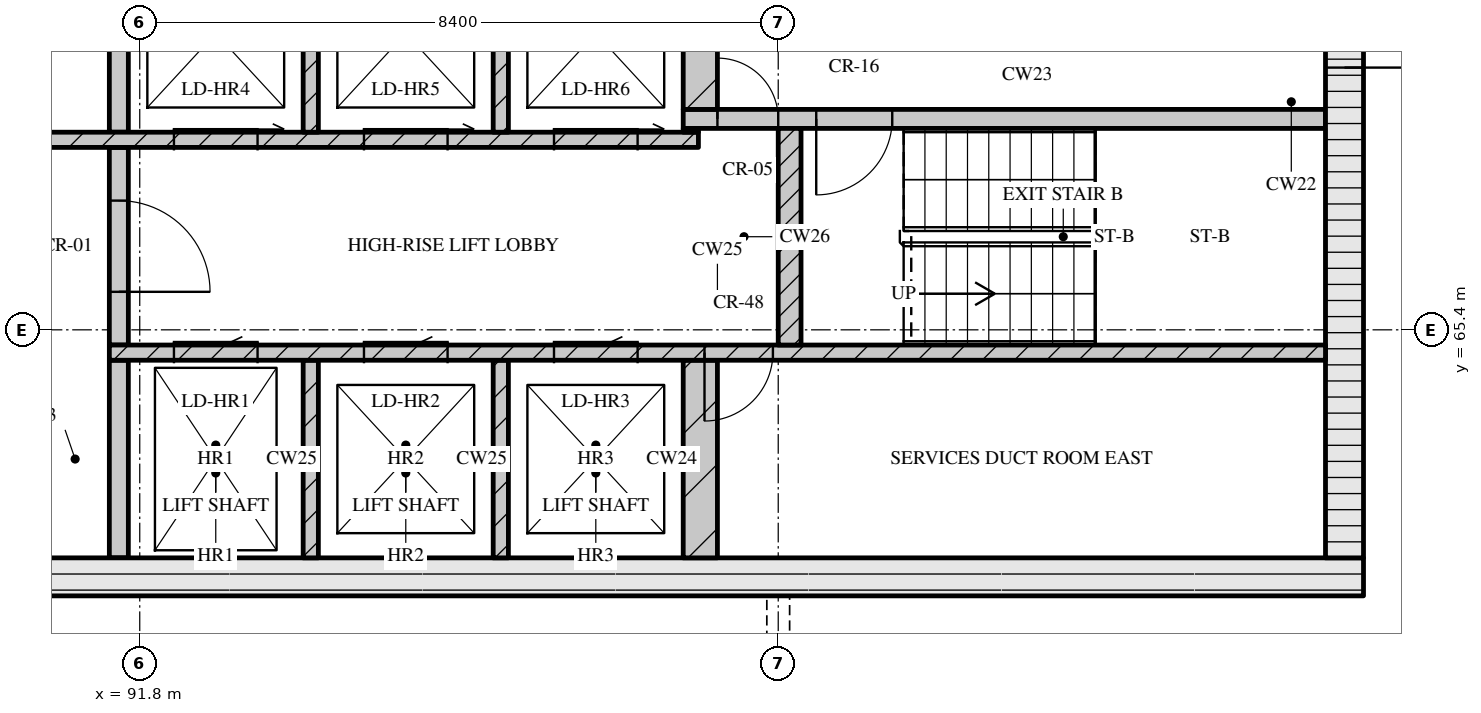
"""IFC4 building model, lengths in metres.
Left out: names, types, materials, properties, quantities, classifications, styles, units other than length and angle.
Written with IfcOpenShell. Run it as: python <this file> out.ifc"""

import sys

from ifc_helpers import new_model, si_unit, direction, frame, frame_2d, origin, place, context, subcontext, project, spatial, rectangle, extrude, element, fill, save


model = new_model("IFC4")
c1 = context("Model", 3, precision=1e-05, world=origin(), true_north=direction((0.0, 1.0)))
c2 = subcontext(c1, "Body", "Model", "MODEL_VIEW")
j1 = project(units=[si_unit("LENGTHUNIT", "METRE"), si_unit("PLANEANGLEUNIT", "RADIAN")], contexts=[c1])
p1 = place(None, origin())
s1 = spatial("IfcSite", under=j1, at=p1, CompositionType="ELEMENT")
p2 = place(p1, origin())
s2 = spatial("IfcBuilding", under=s1, at=p2, CompositionType="ELEMENT")
p3 = place(p2, frame((0.0, 0.0, 263.55)))
s3 = spatial("IfcBuildingStorey", under=s2, at=p3, CompositionType="ELEMENT", Elevation=263.55)
p4 = place(p3, frame((67.3, 62.15, 0.0), z_axis=(0.0, 0.0, 1.0), x_axis=(1.0, 0.0, 0.0)))
e1 = element("IfcWall", 1, at=p4, inside=s3, PredefinedType="SOLIDWALL", context=c2, shape_type="SweptSolid", body=[
    extrude(rectangle(XDim=40.6, YDim=0.5, at=frame_2d((20.3, 0.0))), origin(), (0.0, 0.0, 1.0), 3.32),
])
p5 = place(p4, frame((20.65, 0.0, 0.0)))
e2 = element("IfcOpeningElement", 2, at=p5, cuts=e1, PredefinedType="OPENING", context=c2, shape_type="SweptSolid", body=[
    extrude(rectangle(XDim=1.8, YDim=2.1, at=frame_2d((0.9, 1.05))), frame((0.0, 0.26, 0.0), z_axis=(0.0, -1.0, 0.0), x_axis=(1.0, 0.0, 0.0)), (0.0, 0.0, 1.0), 0.52),
])
p6 = place(p3, frame((107.65, 62.4, 0.0), z_axis=(0.0, 0.0, 1.0), x_axis=(0.0, 1.0, 0.0)))
e3 = element("IfcWall", 3, at=p6, inside=s3, PredefinedType="SOLIDWALL", context=c2, shape_type="SweptSolid", body=[
    extrude(rectangle(XDim=12.0, YDim=0.5, at=frame_2d((6.0, 0.0))), origin(), (0.0, 0.0, 1.0), 3.32),
])
p7 = place(p6, frame((6.45, 0.0, 0.0)))
e4 = element("IfcOpeningElement", 4, at=p7, cuts=e3, PredefinedType="OPENING", context=c2, shape_type="SweptSolid", body=[
    extrude(rectangle(XDim=1.2, YDim=2.1, at=frame_2d((0.6, 1.05))), frame((0.0, 0.26, 0.0), z_axis=(0.0, -1.0, 0.0), x_axis=(1.0, 0.0, 0.0)), (0.0, 0.0, 1.0), 0.52),
])
p8 = place(p3, frame((91.525, 62.4, 0.0), z_axis=(0.0, 0.0, 1.0), x_axis=(0.0, 1.0, 0.0)))
e5 = element("IfcWall", 5, at=p8, inside=s3, PredefinedType="SOLIDWALL", context=c2, shape_type="SweptSolid", body=[
    extrude(rectangle(XDim=2.6, YDim=0.25, at=frame_2d((1.3, 0.0))), origin(), (0.0, 0.0, 1.0), 3.32),
])
for number, where, z_axis, x_axis in (
    (6, (94.05, 62.4, 0.0), (0.0, 0.0, 1.0), (0.0, 1.0, 0.0)),
    (7, (96.55, 62.4, 0.0), (0.0, 0.0, 1.0), (0.0, 1.0, 0.0)),
):
    element("IfcWall", number, at=place(p3, frame(where, z_axis=z_axis, x_axis=x_axis)), inside=s3, PredefinedType="SOLIDWALL", context=c2, shape_type="SweptSolid", body=[
        extrude(rectangle(XDim=2.6, YDim=0.2, at=frame_2d((1.3, 0.0))), origin(), (0.0, 0.0, 1.0), 3.32),
    ])
p9 = place(p3, frame((99.175, 62.4, 0.0), z_axis=(0.0, 0.0, 1.0), x_axis=(0.0, 1.0, 0.0)))
e8 = element("IfcWall", 8, at=p9, inside=s3, PredefinedType="SOLIDWALL", context=c2, shape_type="SweptSolid", body=[
    extrude(rectangle(XDim=2.6, YDim=0.45, at=frame_2d((1.3, 0.0))), origin(), (0.0, 0.0, 1.0), 3.32),
])
p10 = place(p3, frame((91.4, 65.1, 0.0), z_axis=(0.0, 0.0, 1.0), x_axis=(1.0, 0.0, 0.0)))
e9 = element("IfcWall", 9, at=p10, inside=s3, PredefinedType="SOLIDWALL", context=c2, shape_type="SweptSolid", body=[
    extrude(rectangle(XDim=16.0, YDim=0.2, at=frame_2d((8.0, 0.0))), origin(), (0.0, 0.0, 1.0), 3.32),
])
p11 = place(p10, frame((0.85, 0.0, 0.0)))
e10 = element("IfcOpeningElement", 10, at=p11, cuts=e9, PredefinedType="OPENING", context=c2, shape_type="SweptSolid", body=[
    extrude(rectangle(XDim=1.1, YDim=2.1, at=frame_2d((0.55, 1.05))), frame((0.0, 0.11, 0.0), z_axis=(0.0, -1.0, 0.0), x_axis=(1.0, 0.0, 0.0)), (0.0, 0.0, 1.0), 0.22),
])
p12 = place(p10, frame((3.35, 0.0, 0.0)))
e11 = element("IfcOpeningElement", 11, at=p12, cuts=e9, PredefinedType="OPENING", context=c2, shape_type="SweptSolid", body=[
    extrude(rectangle(XDim=1.1, YDim=2.1, at=frame_2d((0.55, 1.05))), frame((0.0, 0.11, 0.0), z_axis=(0.0, -1.0, 0.0), x_axis=(1.0, 0.0, 0.0)), (0.0, 0.0, 1.0), 0.22),
])
p13 = place(p10, frame((5.85, 0.0, 0.0)))
e12 = element("IfcOpeningElement", 12, at=p13, cuts=e9, PredefinedType="OPENING", context=c2, shape_type="SweptSolid", body=[
    extrude(rectangle(XDim=1.1, YDim=2.1, at=frame_2d((0.55, 1.05))), frame((0.0, 0.11, 0.0), z_axis=(0.0, -1.0, 0.0), x_axis=(1.0, 0.0, 0.0)), (0.0, 0.0, 1.0), 0.22),
])
p14 = place(p10, frame((7.83, 0.0, 0.0)))
e13 = element("IfcOpeningElement", 13, at=p14, cuts=e9, PredefinedType="OPENING", context=c2, shape_type="SweptSolid", body=[
    extrude(rectangle(XDim=0.9, YDim=2.1, at=frame_2d((0.45, 1.05))), frame((0.0, 0.11, 0.0), z_axis=(0.0, -1.0, 0.0), x_axis=(1.0, 0.0, 0.0)), (0.0, 0.0, 1.0), 0.22),
])
p15 = place(p3, frame((91.525, 65.2, 0.0), z_axis=(0.0, 0.0, 1.0), x_axis=(0.0, 1.0, 0.0)))
e14 = element("IfcWall", 14, at=p15, inside=s3, PredefinedType="SOLIDWALL", context=c2, shape_type="SweptSolid", body=[
    extrude(rectangle(XDim=2.6, YDim=0.25, at=frame_2d((1.3, 0.0))), origin(), (0.0, 0.0, 1.0), 3.32),
])
p16 = place(p15, frame((0.7, 0.0, 0.0)))
e15 = element("IfcOpeningElement", 15, at=p16, cuts=e14, PredefinedType="OPENING", context=c2, shape_type="SweptSolid", body=[
    extrude(rectangle(XDim=1.2, YDim=2.1, at=frame_2d((0.6, 1.05))), frame((0.0, 0.135, 0.0), z_axis=(0.0, -1.0, 0.0), x_axis=(1.0, 0.0, 0.0)), (0.0, 0.0, 1.0), 0.27),
])
p17 = place(p3, frame((100.35, 65.2, 0.0), z_axis=(0.0, 0.0, 1.0), x_axis=(0.0, 1.0, 0.0)))
e16 = element("IfcWall", 16, at=p17, inside=s3, PredefinedType="SOLIDWALL", context=c2, shape_type="SweptSolid", body=[
    extrude(rectangle(XDim=2.85, YDim=0.3, at=frame_2d((1.425, 0.0))), origin(), (0.0, 0.0, 1.0), 3.32),
])
p18 = place(p3, frame((76.05, 67.9, 0.0), z_axis=(0.0, 0.0, 1.0), x_axis=(1.0, 0.0, 0.0)))
e17 = element("IfcWall", 17, at=p18, inside=s3, PredefinedType="SOLIDWALL", context=c2, shape_type="SweptSolid", body=[
    extrude(rectangle(XDim=23.1, YDim=0.2, at=frame_2d((11.55, 0.0))), origin(), (0.0, 0.0, 1.0), 3.32),
])
p19 = place(p18, frame((1.4, 0.0, 0.0)))
e18 = element("IfcOpeningElement", 18, at=p19, cuts=e17, PredefinedType="OPENING", context=c2, shape_type="SweptSolid", body=[
    extrude(rectangle(XDim=0.9, YDim=2.1, at=frame_2d((0.45, 1.05))), frame((0.0, 0.11, 0.0), z_axis=(0.0, -1.0, 0.0), x_axis=(1.0, 0.0, 0.0)), (0.0, 0.0, 1.0), 0.22),
])
p20 = place(p18, frame((5.11, 0.0, 0.0)))
e19 = element("IfcOpeningElement", 19, at=p20, cuts=e17, PredefinedType="OPENING", context=c2, shape_type="SweptSolid", body=[
    extrude(rectangle(XDim=0.9, YDim=2.1, at=frame_2d((0.45, 1.05))), frame((0.0, 0.11, 0.0), z_axis=(0.0, -1.0, 0.0), x_axis=(1.0, 0.0, 0.0)), (0.0, 0.0, 1.0), 0.22),
])
p21 = place(p18, frame((8.45, 0.0, 0.0)))
e20 = element("IfcOpeningElement", 20, at=p21, cuts=e17, PredefinedType="OPENING", context=c2, shape_type="SweptSolid", body=[
    extrude(rectangle(XDim=0.9, YDim=2.1, at=frame_2d((0.45, 1.05))), frame((0.0, 0.11, 0.0), z_axis=(0.0, -1.0, 0.0), x_axis=(1.0, 0.0, 0.0)), (0.0, 0.0, 1.0), 0.22),
])
p22 = place(p18, frame((10.91, 0.0, 0.0)))
e21 = element("IfcOpeningElement", 21, at=p22, cuts=e17, PredefinedType="OPENING", context=c2, shape_type="SweptSolid", body=[
    extrude(rectangle(XDim=0.9, YDim=2.1, at=frame_2d((0.45, 1.05))), frame((0.0, 0.11, 0.0), z_axis=(0.0, -1.0, 0.0), x_axis=(1.0, 0.0, 0.0)), (0.0, 0.0, 1.0), 0.22),
])
p23 = place(p18, frame((13.55, 0.0, 0.0)))
e22 = element("IfcOpeningElement", 22, at=p23, cuts=e17, PredefinedType="OPENING", context=c2, shape_type="SweptSolid", body=[
    extrude(rectangle(XDim=1.0, YDim=2.1, at=frame_2d((0.5, 1.05))), frame((0.0, 0.11, 0.0), z_axis=(0.0, -1.0, 0.0), x_axis=(1.0, 0.0, 0.0)), (0.0, 0.0, 1.0), 0.22),
])
p24 = place(p18, frame((16.2, 0.0, 0.0)))
e23 = element("IfcOpeningElement", 23, at=p24, cuts=e17, PredefinedType="OPENING", context=c2, shape_type="SweptSolid", body=[
    extrude(rectangle(XDim=1.1, YDim=2.1, at=frame_2d((0.55, 1.05))), frame((0.0, 0.11, 0.0), z_axis=(0.0, -1.0, 0.0), x_axis=(1.0, 0.0, 0.0)), (0.0, 0.0, 1.0), 0.22),
])
p25 = place(p18, frame((18.7, 0.0, 0.0)))
e24 = element("IfcOpeningElement", 24, at=p25, cuts=e17, PredefinedType="OPENING", context=c2, shape_type="SweptSolid", body=[
    extrude(rectangle(XDim=1.1, YDim=2.1, at=frame_2d((0.55, 1.05))), frame((0.0, 0.11, 0.0), z_axis=(0.0, -1.0, 0.0), x_axis=(1.0, 0.0, 0.0)), (0.0, 0.0, 1.0), 0.22),
])
p26 = place(p18, frame((21.2, 0.0, 0.0)))
e25 = element("IfcOpeningElement", 25, at=p26, cuts=e17, PredefinedType="OPENING", context=c2, shape_type="SweptSolid", body=[
    extrude(rectangle(XDim=1.1, YDim=2.1, at=frame_2d((0.55, 1.05))), frame((0.0, 0.11, 0.0), z_axis=(0.0, -1.0, 0.0), x_axis=(1.0, 0.0, 0.0)), (0.0, 0.0, 1.0), 0.22),
])
p27 = place(p3, frame((91.525, 68.0, 0.0), z_axis=(0.0, 0.0, 1.0), x_axis=(0.0, 1.0, 0.0)))
e26 = element("IfcWall", 26, at=p27, inside=s3, PredefinedType="SOLIDWALL", context=c2, shape_type="SweptSolid", body=[
    extrude(rectangle(XDim=2.6, YDim=0.25, at=frame_2d((1.3, 0.0))), origin(), (0.0, 0.0, 1.0), 3.32),
])
for number, where, z_axis, x_axis in (
    (27, (94.05, 68.0, 0.0), (0.0, 0.0, 1.0), (0.0, 1.0, 0.0)),
    (28, (96.55, 68.0, 0.0), (0.0, 0.0, 1.0), (0.0, 1.0, 0.0)),
):
    element("IfcWall", number, at=place(p3, frame(where, z_axis=z_axis, x_axis=x_axis)), inside=s3, PredefinedType="SOLIDWALL", context=c2, shape_type="SweptSolid", body=[
        extrude(rectangle(XDim=2.6, YDim=0.2, at=frame_2d((1.3, 0.0))), origin(), (0.0, 0.0, 1.0), 3.32),
    ])
p28 = place(p3, frame((98.95, 68.025, 0.0), z_axis=(0.0, 0.0, 1.0), x_axis=(1.0, 0.0, 0.0)))
e29 = element("IfcWall", 29, at=p28, inside=s3, PredefinedType="SOLIDWALL", context=c2, shape_type="SweptSolid", body=[
    extrude(rectangle(XDim=0.2, YDim=0.05, at=frame_2d((0.1, 0.0))), origin(), (0.0, 0.0, 1.0), 3.32),
])
p29 = place(p3, frame((98.95, 68.175, 0.0), z_axis=(0.0, 0.0, 1.0), x_axis=(1.0, 0.0, 0.0)))
e30 = element("IfcWall", 30, at=p29, inside=s3, PredefinedType="SOLIDWALL", context=c2, shape_type="SweptSolid", body=[
    extrude(rectangle(XDim=8.45, YDim=0.25, at=frame_2d((4.225, 0.0))), origin(), (0.0, 0.0, 1.0), 3.32),
])
p30 = place(p29, frame((0.45, 0.0, 0.0)))
e31 = element("IfcOpeningElement", 31, at=p30, cuts=e30, PredefinedType="OPENING", context=c2, shape_type="SweptSolid", body=[
    extrude(rectangle(XDim=0.8, YDim=2.1, at=frame_2d((0.4, 1.05))), frame((0.0, 0.135, 0.0), z_axis=(0.0, -1.0, 0.0), x_axis=(1.0, 0.0, 0.0)), (0.0, 0.0, 1.0), 0.27),
])
p31 = place(p29, frame((1.75, 0.0, 0.0)))
e32 = element("IfcOpeningElement", 32, at=p31, cuts=e30, PredefinedType="OPENING", context=c2, shape_type="SweptSolid", body=[
    extrude(rectangle(XDim=1.0, YDim=2.1, at=frame_2d((0.5, 1.05))), frame((0.0, 0.135, 0.0), z_axis=(0.0, -1.0, 0.0), x_axis=(1.0, 0.0, 0.0)), (0.0, 0.0, 1.0), 0.27),
])
p32 = place(p3, frame((99.175, 68.3, 0.0), z_axis=(0.0, 0.0, 1.0), x_axis=(0.0, 1.0, 0.0)))
e33 = element("IfcWall", 33, at=p32, inside=s3, PredefinedType="SOLIDWALL", context=c2, shape_type="SweptSolid", body=[
    extrude(rectangle(XDim=2.3, YDim=0.45, at=frame_2d((1.15, 0.0))), origin(), (0.0, 0.0, 1.0), 3.32),
])
p33 = place(p11, origin())
e34 = element("IfcDoor", 34, at=p33, inside=s3, OperationType="SLIDING_TO_LEFT", PredefinedType="DOOR", context=c2, shape_type="SweptSolid", body=[
    extrude(rectangle(XDim=1.1, YDim=2.1, at=frame_2d((0.55, 1.05))), frame((0.0, 0.025, 0.0), z_axis=(0.0, -1.0, 0.0), x_axis=(1.0, 0.0, 0.0)), (0.0, 0.0, 1.0), 0.05),
])
fill(e10, e34)
p34 = place(p12, origin())
e35 = element("IfcDoor", 35, at=p34, inside=s3, OperationType="SLIDING_TO_LEFT", PredefinedType="DOOR", context=c2, shape_type="SweptSolid", body=[
    extrude(rectangle(XDim=1.1, YDim=2.1, at=frame_2d((0.55, 1.05))), frame((0.0, 0.025, 0.0), z_axis=(0.0, -1.0, 0.0), x_axis=(1.0, 0.0, 0.0)), (0.0, 0.0, 1.0), 0.05),
])
fill(e11, e35)
p35 = place(p13, origin())
e36 = element("IfcDoor", 36, at=p35, inside=s3, OperationType="SLIDING_TO_LEFT", PredefinedType="DOOR", context=c2, shape_type="SweptSolid", body=[
    extrude(rectangle(XDim=1.1, YDim=2.1, at=frame_2d((0.55, 1.05))), frame((0.0, 0.025, 0.0), z_axis=(0.0, -1.0, 0.0), x_axis=(1.0, 0.0, 0.0)), (0.0, 0.0, 1.0), 0.05),
])
fill(e12, e36)
p36 = place(p14, origin())
e37 = element("IfcDoor", 37, at=p36, inside=s3, OperationType="SINGLE_SWING_RIGHT", PredefinedType="DOOR", context=c2, shape_type="SweptSolid", body=[
    extrude(rectangle(XDim=0.9, YDim=2.1, at=frame_2d((0.45, 1.05))), frame((0.0, 0.025, 0.0), z_axis=(0.0, -1.0, 0.0), x_axis=(1.0, 0.0, 0.0)), (0.0, 0.0, 1.0), 0.05),
])
fill(e13, e37)
p37 = place(p16, origin())
e38 = element("IfcDoor", 38, at=p37, inside=s3, OperationType="SINGLE_SWING_RIGHT", PredefinedType="DOOR", context=c2, shape_type="SweptSolid", body=[
    extrude(rectangle(XDim=1.2, YDim=2.1, at=frame_2d((0.6, 1.05))), frame((0.0, 0.025, 0.0), z_axis=(0.0, -1.0, 0.0), x_axis=(1.0, 0.0, 0.0)), (0.0, 0.0, 1.0), 0.05),
])
fill(e15, e38)
p38 = place(p24, origin())
e39 = element("IfcDoor", 39, at=p38, inside=s3, OperationType="SLIDING_TO_RIGHT", PredefinedType="DOOR", context=c2, shape_type="SweptSolid", body=[
    extrude(rectangle(XDim=1.1, YDim=2.1, at=frame_2d((0.55, 1.05))), frame((0.0, 0.025, 0.0), z_axis=(0.0, -1.0, 0.0), x_axis=(1.0, 0.0, 0.0)), (0.0, 0.0, 1.0), 0.05),
])
fill(e23, e39)
p39 = place(p25, origin())
e40 = element("IfcDoor", 40, at=p39, inside=s3, OperationType="SLIDING_TO_RIGHT", PredefinedType="DOOR", context=c2, shape_type="SweptSolid", body=[
    extrude(rectangle(XDim=1.1, YDim=2.1, at=frame_2d((0.55, 1.05))), frame((0.0, 0.025, 0.0), z_axis=(0.0, -1.0, 0.0), x_axis=(1.0, 0.0, 0.0)), (0.0, 0.0, 1.0), 0.05),
])
fill(e24, e40)
p40 = place(p26, origin())
e41 = element("IfcDoor", 41, at=p40, inside=s3, OperationType="SLIDING_TO_RIGHT", PredefinedType="DOOR", context=c2, shape_type="SweptSolid", body=[
    extrude(rectangle(XDim=1.1, YDim=2.1, at=frame_2d((0.55, 1.05))), frame((0.0, 0.025, 0.0), z_axis=(0.0, -1.0, 0.0), x_axis=(1.0, 0.0, 0.0)), (0.0, 0.0, 1.0), 0.05),
])
fill(e25, e41)
p41 = place(p30, origin())
e42 = element("IfcDoor", 42, at=p41, inside=s3, OperationType="SINGLE_SWING_LEFT", PredefinedType="DOOR", context=c2, shape_type="SweptSolid", body=[
    extrude(rectangle(XDim=0.8, YDim=2.1, at=frame_2d((0.4, 1.05))), frame((0.0, 0.025, 0.0), z_axis=(0.0, -1.0, 0.0), x_axis=(1.0, 0.0, 0.0)), (0.0, 0.0, 1.0), 0.05),
])
fill(e31, e42)
p42 = place(p31, origin())
e43 = element("IfcDoor", 43, at=p42, inside=s3, OperationType="SINGLE_SWING_RIGHT", PredefinedType="DOOR", context=c2, shape_type="SweptSolid", body=[
    extrude(rectangle(XDim=1.0, YDim=2.1, at=frame_2d((0.5, 1.05))), frame((0.0, 0.025, 0.0), z_axis=(0.0, -1.0, 0.0), x_axis=(1.0, 0.0, 0.0)), (0.0, 0.0, 1.0), 0.05),
])
fill(e32, e43)
p43 = place(p7, origin())
e44 = element("IfcDoor", 44, at=p43, inside=s3, OperationType="SINGLE_SWING_RIGHT", PredefinedType="DOOR", context=c2, shape_type="SweptSolid", body=[
    extrude(rectangle(XDim=1.2, YDim=2.1, at=frame_2d((0.6, 1.05))), frame((0.0, 0.025, 0.0), z_axis=(0.0, -1.0, 0.0), x_axis=(1.0, 0.0, 0.0)), (0.0, 0.0, 1.0), 0.05),
])
fill(e4, e44)
save(model, sys.argv[1])
